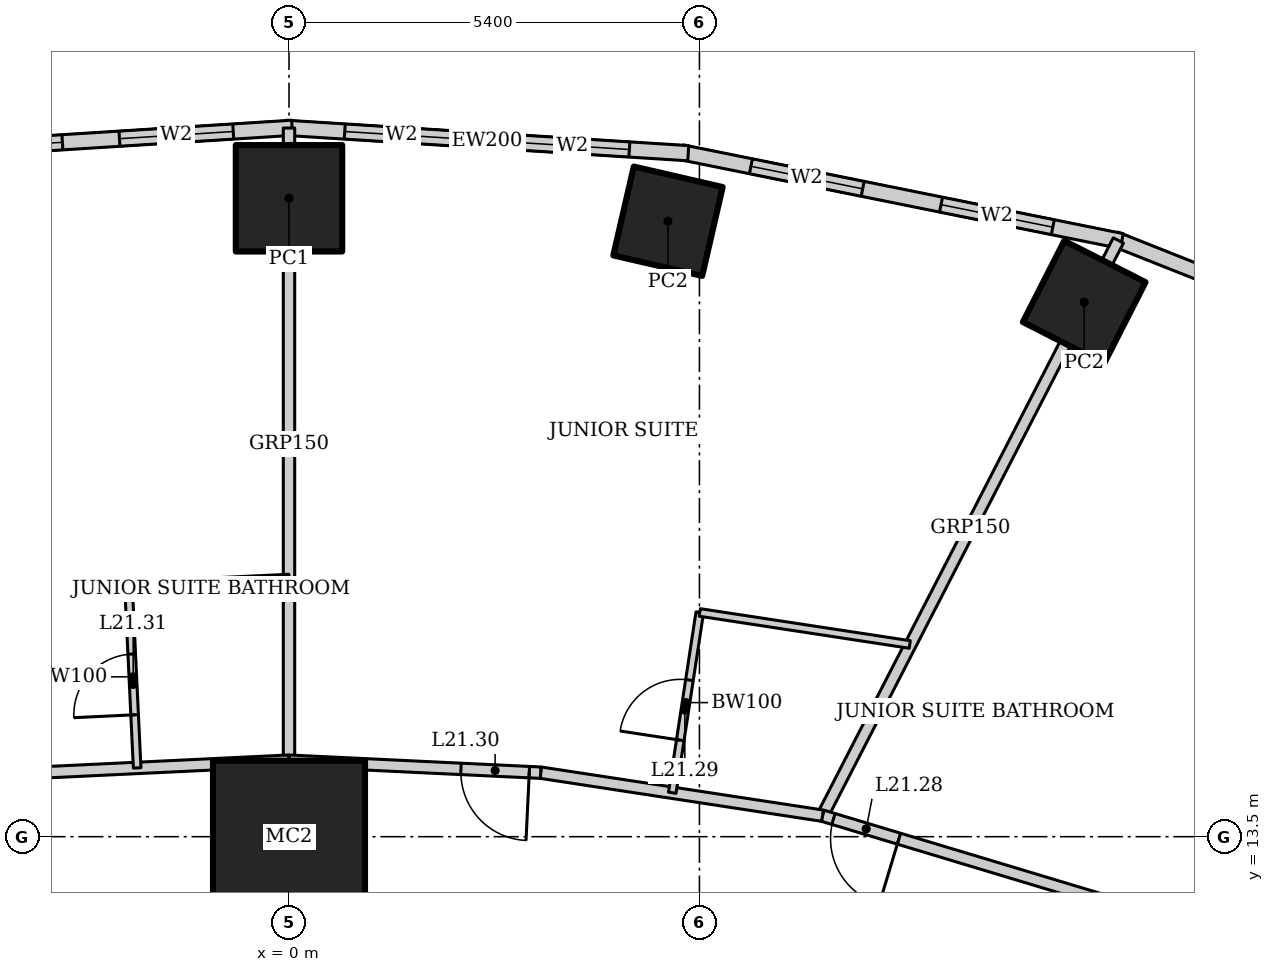
"""IFC4 building model, lengths in metres.
Left out: names, types, materials, properties, quantities, classifications, styles, units other than length and angle.
Written with IfcOpenShell. Run it as: python <this file> out.ifc"""

import sys

from ifc_helpers import new_model, si_unit, direction, frame, frame_2d, origin, origin_2d, place, context, subcontext, project, spatial, rectangle, hollow_rectangle, extrude, element, fill, save


model = new_model("IFC4")
c1 = context("Model", 3, precision=1e-05, world=origin(), true_north=direction((0.0, 1.0)))
c2 = subcontext(c1, "Body", "Model", "MODEL_VIEW")
j1 = project(units=[si_unit("LENGTHUNIT", "METRE"), si_unit("PLANEANGLEUNIT", "RADIAN")], contexts=[c1])
p1 = place(None, origin())
s1 = spatial("IfcSite", under=j1, at=p1, CompositionType="ELEMENT")
p2 = place(p1, origin())
s2 = spatial("IfcBuilding", under=s1, at=p2, CompositionType="ELEMENT")
p3 = place(p2, frame((0.0, 0.0, 91.0)))
s3 = spatial("IfcBuildingStorey", under=s2, at=p3, CompositionType="ELEMENT", Elevation=91.0)
p4 = place(p3, frame((0.0, 13.5, 0.0), z_axis=(0.0, 0.0, 1.0), x_axis=(1.0, 0.0, 0.0)))
e1 = element("IfcColumn", 1, at=p4, inside=s3, PredefinedType="COLUMN", context=c2, shape_type="SweptSolid", body=[
    extrude(hollow_rectangle(XDim=2.0, YDim=2.0, WallThickness=0.17, at=origin_2d()), origin(), (0.0, 0.0, 1.0), 3.6),
])
for number, where, z_axis, x_axis in (
    (2, (10.463, 20.534, 0.0), (0.0, 0.0, 1.0), (0.454, 0.891, 0.0)),
    (3, (4.986, 21.598, 0.0), (0.0, 0.0, 1.0), (0.225, 0.974, 0.0)),
):
    element("IfcColumn", number, at=place(p3, frame(where, z_axis=z_axis, x_axis=x_axis)), inside=s3, PredefinedType="COLUMN", context=c2, shape_type="SweptSolid", body=[
        extrude(hollow_rectangle(XDim=1.2, YDim=1.2, WallThickness=0.1, at=origin_2d()), origin(), (0.0, 0.0, 1.0), 3.6),
    ])
p5 = place(p3, frame((0.0, 21.9, 0.0), z_axis=(0.0, 0.0, 1.0), x_axis=(1.0, 0.0, 0.0)))
e4 = element("IfcColumn", 4, at=p5, inside=s3, PredefinedType="COLUMN", context=c2, shape_type="SweptSolid", body=[
    extrude(hollow_rectangle(XDim=1.4, YDim=1.4, WallThickness=0.1, at=origin_2d()), origin(), (0.0, 0.0, 1.0), 3.6),
])
p6 = place(p3, frame((18.018, 18.523, 0.0), z_axis=(0.0, 0.0, 1.0), x_axis=(-0.929358351251, 0.369178892895, 0.0)))
e5 = element("IfcWall", 5, at=p6, inside=s3, PredefinedType="SOLIDWALL", context=c2, shape_type="SweptSolid", body=[
    extrude(rectangle(XDim=7.692, YDim=0.2, at=frame_2d((3.846, 0.0))), origin(), (0.0, 0.0, 1.0), 3.45),
])
p7 = place(p6, frame((1.373, 0.0, 0.5)))
e6 = element("IfcOpeningElement", 6, at=p7, cuts=e5, PredefinedType="OPENING", context=c2, shape_type="SweptSolid", body=[
    extrude(rectangle(XDim=1.5, YDim=2.2, at=frame_2d((0.75, 1.1))), frame((0.0, 0.11, 0.0), z_axis=(0.0, -1.0, 0.0), x_axis=(1.0, 0.0, 0.0)), (0.0, 0.0, 1.0), 0.22),
])
p8 = place(p6, frame((4.819, 0.0, 0.5)))
e7 = element("IfcOpeningElement", 7, at=p8, cuts=e5, PredefinedType="OPENING", context=c2, shape_type="SweptSolid", body=[
    extrude(rectangle(XDim=1.5, YDim=2.2, at=frame_2d((0.75, 1.1))), frame((0.0, 0.11, 0.0), z_axis=(0.0, -1.0, 0.0), x_axis=(1.0, 0.0, 0.0)), (0.0, 0.0, 1.0), 0.22),
])
p9 = place(p3, frame((10.957, 21.337, 0.0), z_axis=(0.0, 0.0, 1.0), x_axis=(-0.980251657452, 0.197754110105, 0.0)))
e8 = element("IfcWall", 8, at=p9, inside=s3, PredefinedType="SOLIDWALL", context=c2, shape_type="SweptSolid", body=[
    extrude(rectangle(XDim=5.904, YDim=0.2, at=frame_2d((2.952, 0.0))), origin(), (0.0, 0.0, 1.0), 3.45),
])
p10 = place(p9, frame((0.926, 0.0, 0.5)))
e9 = element("IfcOpeningElement", 9, at=p10, cuts=e8, PredefinedType="OPENING", context=c2, shape_type="SweptSolid", body=[
    extrude(rectangle(XDim=1.5, YDim=2.2, at=frame_2d((0.75, 1.1))), frame((0.0, 0.11, 0.0), z_axis=(0.0, -1.0, 0.0), x_axis=(1.0, 0.0, 0.0)), (0.0, 0.0, 1.0), 0.22),
])
p11 = place(p9, frame((3.478, 0.0, 0.5)))
e10 = element("IfcOpeningElement", 10, at=p11, cuts=e8, PredefinedType="OPENING", context=c2, shape_type="SweptSolid", body=[
    extrude(rectangle(XDim=1.5, YDim=2.2, at=frame_2d((0.75, 1.1))), frame((0.0, 0.11, 0.0), z_axis=(0.0, -1.0, 0.0), x_axis=(1.0, 0.0, 0.0)), (0.0, 0.0, 1.0), 0.22),
])
p12 = place(p3, frame((5.253, 22.493, 0.0), z_axis=(0.0, 0.0, 1.0), x_axis=(-0.998018582375, 0.062919863585, 0.0)))
e11 = element("IfcWall", 11, at=p12, inside=s3, PredefinedType="SOLIDWALL", context=c2, shape_type="SweptSolid", body=[
    extrude(rectangle(XDim=5.304, YDim=0.2, at=frame_2d((2.652, 0.0))), origin(), (0.0, 0.0, 1.0), 3.45),
])
p13 = place(p12, frame((0.776, 0.0, 0.5)))
e12 = element("IfcOpeningElement", 12, at=p13, cuts=e11, PredefinedType="OPENING", context=c2, shape_type="SweptSolid", body=[
    extrude(rectangle(XDim=1.5, YDim=2.2, at=frame_2d((0.75, 1.1))), frame((0.0, 0.11, 0.0), z_axis=(0.0, -1.0, 0.0), x_axis=(1.0, 0.0, 0.0)), (0.0, 0.0, 1.0), 0.22),
])
p14 = place(p12, frame((3.028, 0.0, 0.5)))
e13 = element("IfcOpeningElement", 13, at=p14, cuts=e11, PredefinedType="OPENING", context=c2, shape_type="SweptSolid", body=[
    extrude(rectangle(XDim=1.5, YDim=2.2, at=frame_2d((0.75, 1.1))), frame((0.0, 0.11, 0.0), z_axis=(0.0, -1.0, 0.0), x_axis=(1.0, 0.0, 0.0)), (0.0, 0.0, 1.0), 0.22),
])
p15 = place(p3, frame((0.041, 22.827, 0.0), z_axis=(0.0, 0.0, 1.0), x_axis=(-0.998018582375, -0.062919863585, 0.0)))
e14 = element("IfcWall", 14, at=p15, inside=s3, PredefinedType="SOLIDWALL", context=c2, shape_type="SweptSolid", body=[
    extrude(rectangle(XDim=5.304, YDim=0.2, at=frame_2d((2.652, 0.0))), origin(), (0.0, 0.0, 1.0), 3.45),
])
p16 = place(p15, frame((0.776, 0.0, 0.5)))
e15 = element("IfcOpeningElement", 15, at=p16, cuts=e14, PredefinedType="OPENING", context=c2, shape_type="SweptSolid", body=[
    extrude(rectangle(XDim=1.5, YDim=2.2, at=frame_2d((0.75, 1.1))), frame((0.0, 0.11, 0.0), z_axis=(0.0, -1.0, 0.0), x_axis=(1.0, 0.0, 0.0)), (0.0, 0.0, 1.0), 0.22),
])
p17 = place(p15, frame((3.028, 0.0, 0.5)))
e16 = element("IfcOpeningElement", 16, at=p17, cuts=e14, PredefinedType="OPENING", context=c2, shape_type="SweptSolid", body=[
    extrude(rectangle(XDim=1.5, YDim=2.2, at=frame_2d((0.75, 1.1))), frame((0.0, 0.11, 0.0), z_axis=(0.0, -1.0, 0.0), x_axis=(1.0, 0.0, 0.0)), (0.0, 0.0, 1.0), 0.22),
])
p18 = place(p3, frame((10.912, 21.346, 0.0), z_axis=(0.0, 0.0, 1.0), x_axis=(-0.457327273085, -0.889298468059, 0.0)))
e17 = element("IfcWall", 17, at=p18, inside=s3, PredefinedType="PARTITIONING", context=c2, shape_type="SweptSolid", body=[
    extrude(rectangle(XDim=8.511, YDim=0.15, at=frame_2d((4.256, 0.0))), origin(), (0.0, 0.0, 1.0), 2.528),
])
p19 = place(p3, frame((0.0, 22.825, 0.0), z_axis=(0.0, 0.0, 1.0), x_axis=(0.0, -1.0, 0.0)))
e18 = element("IfcWall", 18, at=p19, inside=s3, PredefinedType="PARTITIONING", context=c2, shape_type="SweptSolid", body=[
    extrude(rectangle(XDim=8.325, YDim=0.15, at=frame_2d((4.162, 0.0))), origin(), (0.0, 0.0, 1.0), 2.924),
])
p20 = place(p3, frame((11.888, 12.311, 0.0), z_axis=(0.0, 0.0, 1.0), x_axis=(-0.957564241242, 0.288219922793, 0.0)))
e19 = element("IfcWall", 19, at=p20, inside=s3, PredefinedType="PARTITIONING", context=c2, shape_type="SweptSolid", body=[
    extrude(rectangle(XDim=5.085, YDim=0.15, at=frame_2d((2.542, 0.0))), origin(), (0.0, 0.0, 1.0), 3.45),
])
p21 = place(p20, frame((4.035, 0.0, 0.0)))
e20 = element("IfcOpeningElement", 20, at=p21, cuts=e19, PredefinedType="OPENING", context=c2, shape_type="SweptSolid", body=[
    extrude(rectangle(XDim=0.9, YDim=2.1, at=frame_2d((0.45, 1.05))), frame((0.0, 0.085, 0.0), z_axis=(0.0, -1.0, 0.0), x_axis=(1.0, 0.0, 0.0)), (0.0, 0.0, 1.0), 0.17),
])
p22 = place(p3, frame((7.019, 13.776, 0.0), z_axis=(0.0, 0.0, 1.0), x_axis=(-0.988564270062, 0.150800145746, 0.0)))
e21 = element("IfcWall", 21, at=p22, inside=s3, PredefinedType="PARTITIONING", context=c2, shape_type="SweptSolid", body=[
    extrude(rectangle(XDim=3.751, YDim=0.15, at=frame_2d((1.875, 0.0))), origin(), (0.0, 0.0, 1.0), 3.45),
])
p23 = place(p3, frame((3.311, 14.342, 0.0), z_axis=(0.0, 0.0, 1.0), x_axis=(-0.998863968075, 0.047652631422, 0.0)))
e22 = element("IfcWall", 22, at=p23, inside=s3, PredefinedType="PARTITIONING", context=c2, shape_type="SweptSolid", body=[
    extrude(rectangle(XDim=3.315, YDim=0.15, at=frame_2d((1.657, 0.0))), origin(), (0.0, 0.0, 1.0), 3.45),
])
p24 = place(p23, frame((0.15, 0.0, 0.0)))
e23 = element("IfcOpeningElement", 23, at=p24, cuts=e22, PredefinedType="OPENING", context=c2, shape_type="SweptSolid", body=[
    extrude(rectangle(XDim=0.9, YDim=2.1, at=frame_2d((0.45, 1.05))), frame((0.0, 0.085, 0.0), z_axis=(0.0, -1.0, 0.0), x_axis=(1.0, 0.0, 0.0)), (0.0, 0.0, 1.0), 0.17),
])
p25 = place(p3, frame((0.0, 14.5, 0.0), z_axis=(0.0, 0.0, 1.0), x_axis=(-0.998863968075, -0.047652631422, 0.0)))
e24 = element("IfcWall", 24, at=p25, inside=s3, PredefinedType="PARTITIONING", context=c2, shape_type="SweptSolid", body=[
    extrude(rectangle(XDim=3.315, YDim=0.15, at=frame_2d((1.657, 0.0))), origin(), (0.0, 0.0, 1.0), 3.45),
])
p26 = place(p3, frame((5.042, 14.078, 0.0), z_axis=(0.0, 0.0, 1.0), x_axis=(0.150856962013, 0.988555601376, 0.0)))
e25 = element("IfcWall", 25, at=p26, inside=s3, PredefinedType="PARTITIONING", context=c2, shape_type="SweptSolid", body=[
    extrude(rectangle(XDim=2.4, YDim=0.1, at=frame_2d((1.2, 0.0))), origin(), (0.0, 0.0, 1.0), 3.45),
])
p27 = place(p26, frame((0.7, 0.0, 0.0)))
e26 = element("IfcOpeningElement", 26, at=p27, cuts=e25, PredefinedType="OPENING", context=c2, shape_type="SweptSolid", body=[
    extrude(rectangle(XDim=0.8, YDim=2.1, at=frame_2d((0.4, 1.05))), frame((0.0, 0.06, 0.0), z_axis=(0.0, -1.0, 0.0), x_axis=(1.0, 0.0, 0.0)), (0.0, 0.0, 1.0), 0.12),
])
p28 = place(p3, frame((5.404, 16.45, 0.0), z_axis=(0.0, 0.0, 1.0), x_axis=(0.988568792086, -0.150770498819, 0.0)))
e27 = element("IfcWall", 27, at=p28, inside=s3, PredefinedType="PARTITIONING", context=c2, shape_type="SweptSolid", body=[
    extrude(rectangle(XDim=2.795, YDim=0.1, at=frame_2d((1.397, 0.0))), origin(), (0.0, 0.0, 1.0), 3.45),
])
p29 = place(p3, frame((-1.998, 14.405, 0.0), z_axis=(0.0, 0.0, 1.0), x_axis=(-0.047608648396, 0.998866065395, 0.0)))
e28 = element("IfcWall", 28, at=p29, inside=s3, PredefinedType="PARTITIONING", context=c2, shape_type="SweptSolid", body=[
    extrude(rectangle(XDim=2.4, YDim=0.1, at=frame_2d((1.2, 0.0))), origin(), (0.0, 0.0, 1.0), 2.749),
])
p30 = place(p29, frame((0.7, 0.0, 0.0)))
e29 = element("IfcOpeningElement", 29, at=p30, cuts=e28, PredefinedType="OPENING", context=c2, shape_type="SweptSolid", body=[
    extrude(rectangle(XDim=0.8, YDim=2.1, at=frame_2d((0.4, 1.05))), frame((0.0, 0.06, 0.0), z_axis=(0.0, -1.0, 0.0), x_axis=(1.0, 0.0, 0.0)), (0.0, 0.0, 1.0), 0.12),
])
p31 = place(p3, frame((-2.112, 16.802, 0.0), z_axis=(0.0, 0.0, 1.0), x_axis=(0.998862383453, 0.047685835668, 0.0)))
e30 = element("IfcWall", 30, at=p31, inside=s3, PredefinedType="PARTITIONING", context=c2, shape_type="SweptSolid", body=[
    extrude(rectangle(XDim=2.115, YDim=0.1, at=frame_2d((1.057, 0.0))), origin(), (0.0, 0.0, 1.0), 3.45),
])
p32 = place(p10, origin())
e31 = element("IfcWindow", 31, at=p32, inside=s3, PartitioningType="SINGLE_PANEL", PredefinedType="WINDOW", context=c2, shape_type="SweptSolid", body=[
    extrude(rectangle(XDim=1.5, YDim=2.2, at=frame_2d((0.75, 1.1))), frame((0.0, 0.03, 0.0), z_axis=(0.0, -1.0, 0.0), x_axis=(1.0, 0.0, 0.0)), (0.0, 0.0, 1.0), 0.06),
])
fill(e9, e31)
p33 = place(p11, origin())
e32 = element("IfcWindow", 32, at=p33, inside=s3, PartitioningType="SINGLE_PANEL", PredefinedType="WINDOW", context=c2, shape_type="SweptSolid", body=[
    extrude(rectangle(XDim=1.5, YDim=2.2, at=frame_2d((0.75, 1.1))), frame((0.0, 0.03, 0.0), z_axis=(0.0, -1.0, 0.0), x_axis=(1.0, 0.0, 0.0)), (0.0, 0.0, 1.0), 0.06),
])
fill(e10, e32)
p34 = place(p13, origin())
e33 = element("IfcWindow", 33, at=p34, inside=s3, PartitioningType="SINGLE_PANEL", PredefinedType="WINDOW", context=c2, shape_type="SweptSolid", body=[
    extrude(rectangle(XDim=1.5, YDim=2.2, at=frame_2d((0.75, 1.1))), frame((0.0, 0.03, 0.0), z_axis=(0.0, -1.0, 0.0), x_axis=(1.0, 0.0, 0.0)), (0.0, 0.0, 1.0), 0.06),
])
fill(e12, e33)
p35 = place(p14, origin())
e34 = element("IfcWindow", 34, at=p35, inside=s3, PartitioningType="SINGLE_PANEL", PredefinedType="WINDOW", context=c2, shape_type="SweptSolid", body=[
    extrude(rectangle(XDim=1.5, YDim=2.2, at=frame_2d((0.75, 1.1))), frame((0.0, 0.03, 0.0), z_axis=(0.0, -1.0, 0.0), x_axis=(1.0, 0.0, 0.0)), (0.0, 0.0, 1.0), 0.06),
])
fill(e13, e34)
p36 = place(p16, origin())
e35 = element("IfcWindow", 35, at=p36, inside=s3, PartitioningType="SINGLE_PANEL", PredefinedType="WINDOW", context=c2, shape_type="SweptSolid", body=[
    extrude(rectangle(XDim=1.5, YDim=2.2, at=frame_2d((0.75, 1.1))), frame((0.0, 0.03, 0.0), z_axis=(0.0, -1.0, 0.0), x_axis=(1.0, 0.0, 0.0)), (0.0, 0.0, 1.0), 0.06),
])
fill(e15, e35)
p37 = place(p17, origin())
e36 = element("IfcWindow", 36, at=p37, inside=s3, PartitioningType="SINGLE_PANEL", PredefinedType="WINDOW", context=c2, shape_type="SweptSolid", body=[
    extrude(rectangle(XDim=1.5, YDim=2.2, at=frame_2d((0.75, 1.1))), frame((0.0, 0.03, 0.0), z_axis=(0.0, -1.0, 0.0), x_axis=(1.0, 0.0, 0.0)), (0.0, 0.0, 1.0), 0.06),
])
fill(e16, e36)
p38 = place(p21, origin())
e37 = element("IfcDoor", 37, at=p38, inside=s3, OperationType="SINGLE_SWING_LEFT", PredefinedType="DOOR", context=c2, shape_type="SweptSolid", body=[
    extrude(rectangle(XDim=0.9, YDim=2.1, at=frame_2d((0.45, 1.05))), frame((0.0, 0.025, 0.0), z_axis=(0.0, -1.0, 0.0), x_axis=(1.0, 0.0, 0.0)), (0.0, 0.0, 1.0), 0.05),
])
fill(e20, e37)
p39 = place(p27, origin())
e38 = element("IfcDoor", 38, at=p39, inside=s3, OperationType="SINGLE_SWING_LEFT", PredefinedType="DOOR", context=c2, shape_type="SweptSolid", body=[
    extrude(rectangle(XDim=0.8, YDim=2.1, at=frame_2d((0.4, 1.05))), frame((0.0, 0.025, 0.0), z_axis=(0.0, -1.0, 0.0), x_axis=(1.0, 0.0, 0.0)), (0.0, 0.0, 1.0), 0.05),
])
fill(e26, e38)
p40 = place(p24, origin())
e39 = element("IfcDoor", 39, at=p40, inside=s3, OperationType="SINGLE_SWING_LEFT", PredefinedType="DOOR", context=c2, shape_type="SweptSolid", body=[
    extrude(rectangle(XDim=0.9, YDim=2.1, at=frame_2d((0.45, 1.05))), frame((0.0, 0.025, 0.0), z_axis=(0.0, -1.0, 0.0), x_axis=(1.0, 0.0, 0.0)), (0.0, 0.0, 1.0), 0.05),
])
fill(e23, e39)
p41 = place(p30, origin())
e40 = element("IfcDoor", 40, at=p41, inside=s3, OperationType="SINGLE_SWING_LEFT", PredefinedType="DOOR", context=c2, shape_type="SweptSolid", body=[
    extrude(rectangle(XDim=0.8, YDim=2.1, at=frame_2d((0.4, 1.05))), frame((0.0, 0.025, 0.0), z_axis=(0.0, -1.0, 0.0), x_axis=(1.0, 0.0, 0.0)), (0.0, 0.0, 1.0), 0.05),
])
fill(e29, e40)
save(model, sys.argv[1])
